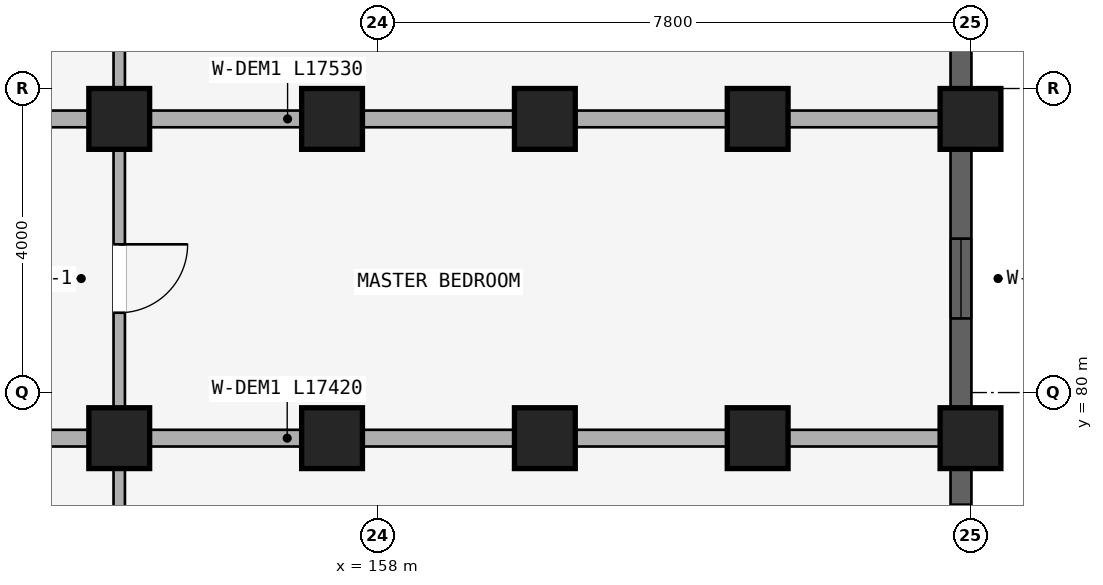
"""IFC4 building model, lengths in metres.
Left out: names, types, materials, properties, quantities, classifications, styles, units other than length and angle.
Written with IfcOpenShell. Run it as: python <this file> out.ifc"""

import sys

from ifc_helpers import new_model, si_unit, direction, frame, frame_2d, origin, origin_2d, place, context, subcontext, project, spatial, rectangle, extrude, element, fill, save


model = new_model("IFC4")
c1 = context("Model", 3, precision=1e-05, world=origin(), true_north=direction((0.0, 1.0)))
c2 = subcontext(c1, "Body", "Model", "MODEL_VIEW")
j1 = project(units=[si_unit("LENGTHUNIT", "METRE"), si_unit("PLANEANGLEUNIT", "RADIAN")], contexts=[c1])
p1 = place(None, origin())
s1 = spatial("IfcSite", under=j1, at=p1, CompositionType="ELEMENT")
p2 = place(p1, origin())
s2 = spatial("IfcBuilding", under=s1, at=p2, CompositionType="ELEMENT")
p3 = place(p2, frame((0.0, 0.0, 8.7)))
s3 = spatial("IfcBuildingStorey", under=s2, at=p3, CompositionType="ELEMENT", Elevation=8.7)
for number, where, z_axis, x_axis in (
    (1, (154.6, 83.6, 0.0), (0.0, 0.0, 1.0), (1.0, 0.0, 0.0)),
    (2, (157.4, 83.6, 0.0), (0.0, 0.0, 1.0), (1.0, 0.0, 0.0)),
    (3, (160.2, 83.6, 0.0), (0.0, 0.0, 1.0), (1.0, 0.0, 0.0)),
    (4, (163.0, 83.6, 0.0), (0.0, 0.0, 1.0), (1.0, 0.0, 0.0)),
    (5, (165.8, 83.6, 0.0), (0.0, 0.0, 1.0), (1.0, 0.0, 0.0)),
    (6, (154.6, 79.4, 0.0), (0.0, 0.0, 1.0), (1.0, 0.0, 0.0)),
    (7, (157.4, 79.4, 0.0), (0.0, 0.0, 1.0), (1.0, 0.0, 0.0)),
    (8, (160.2, 79.4, 0.0), (0.0, 0.0, 1.0), (1.0, 0.0, 0.0)),
    (9, (163.0, 79.4, 0.0), (0.0, 0.0, 1.0), (1.0, 0.0, 0.0)),
    (10, (165.8, 79.4, 0.0), (0.0, 0.0, 1.0), (1.0, 0.0, 0.0)),
):
    element("IfcColumn", number, at=place(p3, frame(where, z_axis=z_axis, x_axis=x_axis)), inside=s3, PredefinedType="COLUMN", context=c2, shape_type="SweptSolid", body=[
        extrude(rectangle(XDim=0.8, YDim=0.8, at=origin_2d()), origin(), (0.0, 0.0, 1.0), 2.93),
    ])
p4 = place(p3, frame((154.6, 87.57, 0.0), z_axis=(0.0, 0.0, 1.0), x_axis=(0.0, -1.0, 0.0)))
e11 = element("IfcWall", 11, at=p4, inside=s3, PredefinedType="PARTITIONING", context=c2, shape_type="SweptSolid", body=[
    extrude(rectangle(XDim=3.89, YDim=0.15, at=frame_2d((1.945, 0.0))), origin(), (0.0, 0.0, 1.0), 2.372),
])
p5 = place(p4, frame((1.495, 0.0, 0.0)))
e12 = element("IfcOpeningElement", 12, at=p5, cuts=e11, PredefinedType="OPENING", context=c2, shape_type="SweptSolid", body=[
    extrude(rectangle(XDim=0.9, YDim=2.1, at=frame_2d((0.45, 1.05))), frame((0.0, 0.085, 0.0), z_axis=(0.0, -1.0, 0.0), x_axis=(1.0, 0.0, 0.0)), (0.0, 0.0, 1.0), 0.17),
])
p6 = place(p3, frame((154.6, 83.52, 0.0), z_axis=(0.0, 0.0, 1.0), x_axis=(0.0, -1.0, 0.0)))
e13 = element("IfcWall", 13, at=p6, inside=s3, PredefinedType="PARTITIONING", context=c2, shape_type="SweptSolid", body=[
    extrude(rectangle(XDim=4.04, YDim=0.15, at=frame_2d((2.02, 0.0))), origin(), (0.0, 0.0, 1.0), 2.372),
])
p7 = place(p6, frame((1.57, 0.0, 0.0)))
e14 = element("IfcOpeningElement", 14, at=p7, cuts=e13, PredefinedType="OPENING", context=c2, shape_type="SweptSolid", body=[
    extrude(rectangle(XDim=0.9, YDim=2.1, at=frame_2d((0.45, 1.05))), frame((0.0, 0.085, 0.0), z_axis=(0.0, -1.0, 0.0), x_axis=(1.0, 0.0, 0.0)), (0.0, 0.0, 1.0), 0.17),
])
p8 = place(p3, frame((148.05, 83.6, 0.0), z_axis=(0.0, 0.0, 1.0), x_axis=(1.0, 0.0, 0.0)))
e15 = element("IfcWall", 15, at=p8, inside=s3, PredefinedType="STANDARD", context=c2, shape_type="SweptSolid", body=[
    extrude(rectangle(XDim=17.53, YDim=0.22, at=frame_2d((8.765, 0.0))), origin(), (0.0, 0.0, 1.0), 2.372),
])
p9 = place(p3, frame((154.6, 79.32, 0.0), z_axis=(0.0, 0.0, 1.0), x_axis=(0.0, -1.0, 0.0)))
e16 = element("IfcWall", 16, at=p9, inside=s3, PredefinedType="PLUMBINGWALL", context=c2, shape_type="SweptSolid", body=[
    extrude(rectangle(XDim=2.64, YDim=0.15, at=frame_2d((1.32, 0.0))), origin(), (0.0, 0.0, 1.0), 2.372),
])
p10 = place(p9, frame((0.87, 0.0, 0.0)))
e17 = element("IfcOpeningElement", 17, at=p10, cuts=e16, PredefinedType="OPENING", context=c2, shape_type="SweptSolid", body=[
    extrude(rectangle(XDim=0.9, YDim=2.1, at=frame_2d((0.45, 1.05))), frame((0.0, 0.085, 0.0), z_axis=(0.0, -1.0, 0.0), x_axis=(1.0, 0.0, 0.0)), (0.0, 0.0, 1.0), 0.17),
])
p11 = place(p3, frame((148.1, 79.4, 0.0), z_axis=(0.0, 0.0, 1.0), x_axis=(1.0, 0.0, 0.0)))
e18 = element("IfcWall", 18, at=p11, inside=s3, PredefinedType="STANDARD", context=c2, shape_type="SweptSolid", body=[
    extrude(rectangle(XDim=17.42, YDim=0.22, at=frame_2d((8.71, 0.0))), origin(), (0.0, 0.0, 1.0), 2.372),
])
p12 = place(p3, frame((165.675, 87.396, 0.0), z_axis=(0.0, 0.0, 1.0), x_axis=(0.0, -1.0, 0.0)))
e19 = element("IfcWall", 19, at=p12, inside=s3, PredefinedType="STANDARD", context=c2, shape_type="SweptSolid", body=[
    extrude(rectangle(XDim=3.393, YDim=0.275, at=frame_2d((1.697, 0.0))), origin(), (0.0, 0.0, 1.0), 2.472),
])
p13 = place(p12, frame((1.171, 0.0, 0.88)))
e20 = element("IfcOpeningElement", 20, at=p13, cuts=e19, PredefinedType="OPENING", context=c2, shape_type="SweptSolid", body=[
    extrude(rectangle(XDim=1.05, YDim=1.25, at=frame_2d((0.525, 0.625))), frame((0.0, 0.147, 0.0), z_axis=(0.0, -1.0, 0.0), x_axis=(1.0, 0.0, 0.0)), (0.0, 0.0, 1.0), 0.295),
])
p14 = place(p3, frame((165.675, 83.197, 0.0), z_axis=(0.0, 0.0, 1.0), x_axis=(0.0, -1.0, 0.0)))
e21 = element("IfcWall", 21, at=p14, inside=s3, PredefinedType="STANDARD", context=c2, shape_type="SweptSolid", body=[
    extrude(rectangle(XDim=3.393, YDim=0.275, at=frame_2d((1.697, 0.0))), origin(), (0.0, 0.0, 1.0), 2.472),
])
p15 = place(p14, frame((1.171, 0.0, 0.88)))
e22 = element("IfcOpeningElement", 22, at=p15, cuts=e21, PredefinedType="OPENING", context=c2, shape_type="SweptSolid", body=[
    extrude(rectangle(XDim=1.05, YDim=1.25, at=frame_2d((0.525, 0.625))), frame((0.0, 0.147, 0.0), z_axis=(0.0, -1.0, 0.0), x_axis=(1.0, 0.0, 0.0)), (0.0, 0.0, 1.0), 0.295),
])
p16 = place(p3, frame((165.675, 78.997, 0.0), z_axis=(0.0, 0.0, 1.0), x_axis=(0.0, -1.0, 0.0)))
e23 = element("IfcWall", 23, at=p16, inside=s3, PredefinedType="STANDARD", context=c2, shape_type="SweptSolid", body=[
    extrude(rectangle(XDim=1.993, YDim=0.275, at=frame_2d((0.997, 0.0))), origin(), (0.0, 0.0, 1.0), 2.472),
])
p17 = place(p16, frame((0.471, 0.0, 0.88)))
e24 = element("IfcOpeningElement", 24, at=p17, cuts=e23, PredefinedType="OPENING", context=c2, shape_type="SweptSolid", body=[
    extrude(rectangle(XDim=1.05, YDim=1.25, at=frame_2d((0.525, 0.625))), frame((0.0, 0.147, 0.0), z_axis=(0.0, -1.0, 0.0), x_axis=(1.0, 0.0, 0.0)), (0.0, 0.0, 1.0), 0.295),
])
p18 = place(p15, origin())
e25 = element("IfcWindow", 25, at=p18, inside=s3, PartitioningType="SINGLE_PANEL", PredefinedType="WINDOW", context=c2, shape_type="SweptSolid", body=[
    extrude(rectangle(XDim=1.05, YDim=1.25, at=frame_2d((0.525, 0.625))), frame((0.0, 0.03, 0.0), z_axis=(0.0, -1.0, 0.0), x_axis=(1.0, 0.0, 0.0)), (0.0, 0.0, 1.0), 0.06),
])
fill(e22, e25)
p19 = place(p17, origin())
e26 = element("IfcWindow", 26, at=p19, inside=s3, PartitioningType="SINGLE_PANEL", PredefinedType="WINDOW", context=c2, shape_type="SweptSolid", body=[
    extrude(rectangle(XDim=1.05, YDim=1.25, at=frame_2d((0.525, 0.625))), frame((0.0, 0.03, 0.0), z_axis=(0.0, -1.0, 0.0), x_axis=(1.0, 0.0, 0.0)), (0.0, 0.0, 1.0), 0.06),
])
fill(e24, e26)
p20 = place(p7, origin())
e27 = element("IfcDoor", 27, at=p20, inside=s3, OperationType="SINGLE_SWING_LEFT", PredefinedType="DOOR", context=c2, shape_type="SweptSolid", body=[
    extrude(rectangle(XDim=0.9, YDim=2.1, at=frame_2d((0.45, 1.05))), frame((0.0, 0.025, 0.0), z_axis=(0.0, -1.0, 0.0), x_axis=(1.0, 0.0, 0.0)), (0.0, 0.0, 1.0), 0.05),
])
fill(e14, e27)
save(model, sys.argv[1])
